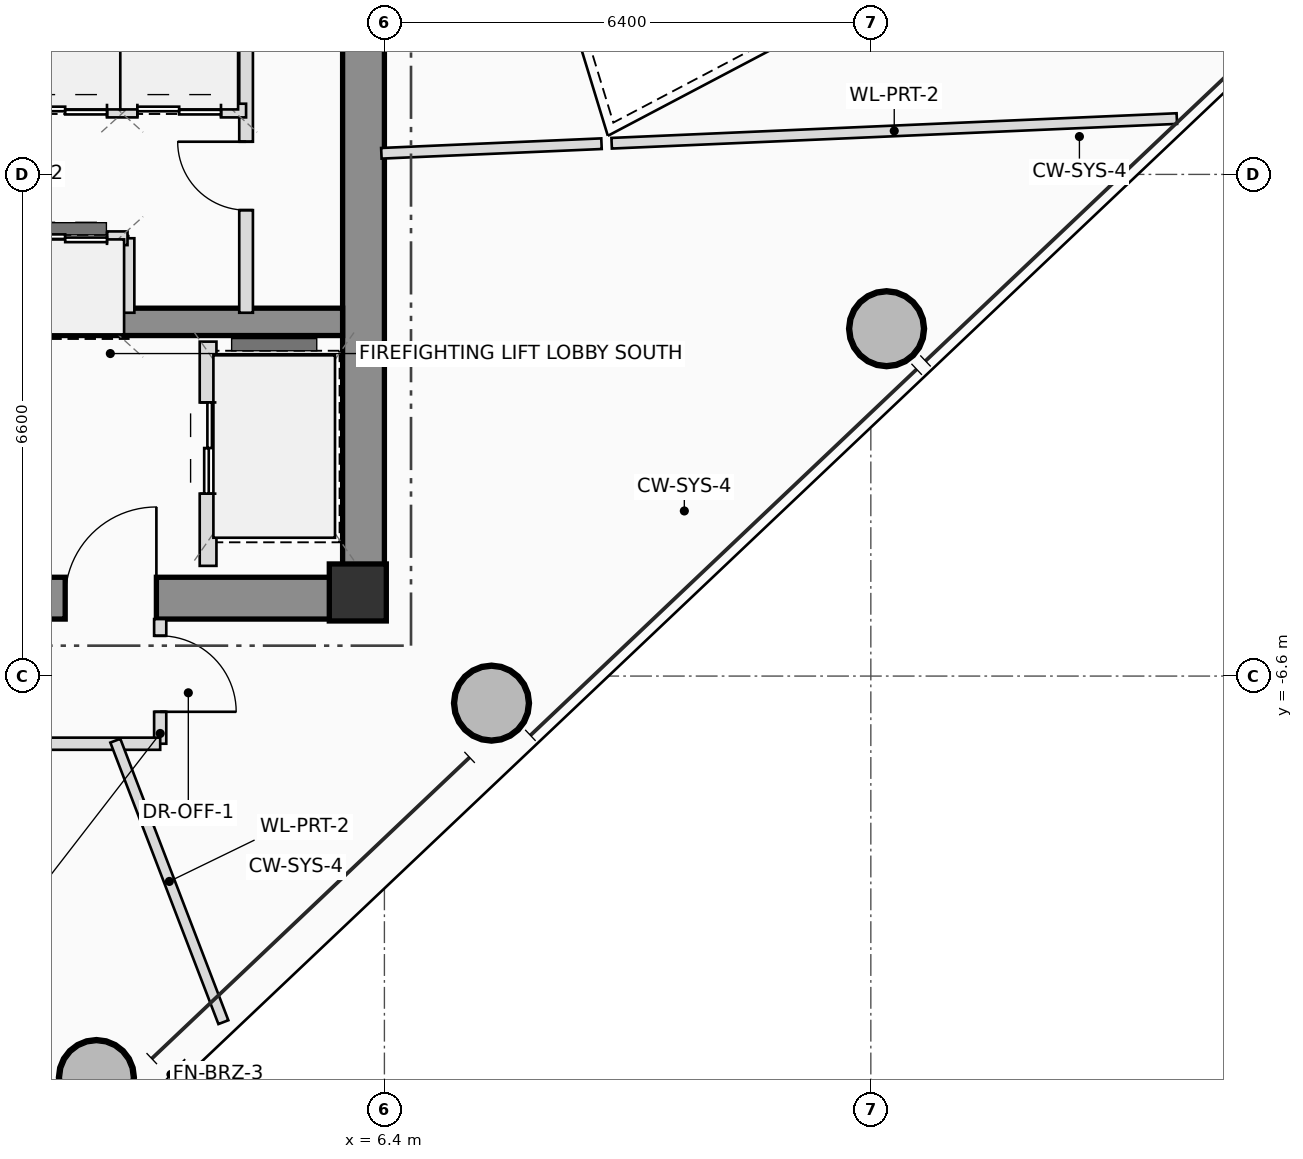
"""IFC4 building model, lengths in metres.
Left out: names, types, materials, properties, quantities, classifications, styles, units other than length and angle.
Written with IfcOpenShell. Run it as: python <this file> out.ifc"""

import sys

from ifc_helpers import new_model, si_unit, direction, frame, frame_2d, origin, origin_2d, place, context, subcontext, project, spatial, rectangle, hollow_circle, extrude, source, transform, mapped, element, fill, save


model = new_model("IFC4")
c1 = context("Model", 3, precision=1e-05, world=origin(), true_north=direction((0.0, 1.0)))
c2 = subcontext(c1, "Body", "Model", "MODEL_VIEW")
j1 = project(units=[si_unit("LENGTHUNIT", "METRE"), si_unit("PLANEANGLEUNIT", "RADIAN")], contexts=[c1])
p1 = place(None, origin())
s1 = spatial("IfcSite", under=j1, at=p1, CompositionType="ELEMENT")
p2 = place(p1, origin())
s2 = spatial("IfcBuilding", under=s1, at=p2, CompositionType="ELEMENT")
p3 = place(p2, frame((0.0, 0.0, 238.85)))
s3 = spatial("IfcBuildingStorey", under=s2, at=p3, CompositionType="ELEMENT", Elevation=238.85)
m1 = source(origin(), c2, "Body", "SweptSolid", [
    extrude(rectangle(XDim=0.75, YDim=0.75, at=origin_2d()), origin(), (0.0, 0.0, 1.0), 3.4),
])
p4 = place(p3, frame((6.05, -5.5, 0.0), z_axis=(0.0, 0.0, 1.0), x_axis=(1.0, 0.0, 0.0)))
e1 = element("IfcColumn", 1, at=p4, inside=s3, PredefinedType="COLUMN", context=c2, shape_type="MappedRepresentation", body=[
    mapped(m1, transform((0.0, 0.0, 0.0), scale=1.0)),
])
p5 = place(p3, frame((-6.4, -5.575, 0.0), z_axis=(0.0, 0.0, 1.0), x_axis=(1.0, 0.0, 0.0)))
e2 = element("IfcWall", 2, at=p5, inside=s3, PredefinedType="SHEAR", context=c2, shape_type="SweptSolid", body=[
    extrude(rectangle(XDim=12.8, YDim=0.55, at=frame_2d((6.4, 0.0))), origin(), (0.0, 0.0, 1.0), 3.4),
])
p6 = place(p5, frame((8.6, 0.0, 0.0)))
e3 = element("IfcOpeningElement", 3, at=p6, cuts=e2, PredefinedType="OPENING", context=c2, shape_type="SweptSolid", body=[
    extrude(rectangle(XDim=1.2, YDim=2.2, at=frame_2d((0.6, 1.1))), frame((0.0, 0.285, 0.0), z_axis=(0.0, -1.0, 0.0), x_axis=(1.0, 0.0, 0.0)), (0.0, 0.0, 1.0), 0.57),
])
p7 = place(p3, frame((6.125, -5.3, 0.0), z_axis=(0.0, 0.0, 1.0), x_axis=(0.0, 1.0, 0.0)))
e4 = element("IfcWall", 4, at=p7, inside=s3, PredefinedType="SHEAR", context=c2, shape_type="SweptSolid", body=[
    extrude(rectangle(XDim=10.6, YDim=0.55, at=frame_2d((5.3, 0.0))), origin(), (0.0, 0.0, 1.0), 3.4),
])
p8 = place(p3, frame((-5.85, -1.94, 0.0), z_axis=(0.0, 0.0, 1.0), x_axis=(1.0, 0.0, 0.0)))
e5 = element("IfcWall", 5, at=p8, inside=s3, PredefinedType="SHEAR", context=c2, shape_type="SweptSolid", body=[
    extrude(rectangle(XDim=11.7, YDim=0.36, at=frame_2d((5.85, 0.0))), origin(), (0.0, 0.0, 1.0), 3.4),
])
m2 = source(origin(), c2, "Body", "SweptSolid", [
    extrude(hollow_circle(Radius=0.5, WallThickness=0.04, at=origin_2d()), origin(), (0.0, 0.0, 1.0), 3.4),
])
for number, where, z_axis, x_axis in (
    (6, (2.611, -11.882, 0.0), (0.0, 0.0, 1.0), (1.0, 0.0, 0.0)),
    (7, (7.809, -6.956, 0.0), (0.0, 0.0, 1.0), (1.0, 0.0, 0.0)),
    (8, (13.007, -2.03, 0.0), (0.0, 0.0, 1.0), (1.0, 0.0, 0.0)),
):
    element("IfcColumn", number, at=place(p3, frame(where, z_axis=z_axis, x_axis=x_axis)), inside=s3, PredefinedType="COLUMN", context=c2, shape_type="MappedRepresentation", body=[
        mapped(m2, transform((0.0, 0.0, 0.0), scale=1.0)),
    ])
p9 = place(p3, frame((4.08, -5.15, 0.0), z_axis=(0.0, 0.0, 1.0), x_axis=(0.0, 1.0, 0.0)))
e9 = element("IfcWall", 9, at=p9, inside=s3, PredefinedType="PLUMBINGWALL", context=c2, shape_type="SweptSolid", body=[
    extrude(rectangle(XDim=2.95, YDim=0.22, at=frame_2d((1.475, 0.0))), origin(), (0.0, 0.0, 1.0), 3.2),
])
p10 = place(p9, frame((0.95, 0.0, 0.0)))
e10 = element("IfcOpeningElement", 10, at=p10, cuts=e9, PredefinedType="OPENING", context=c2, shape_type="SweptSolid", body=[
    extrude(rectangle(XDim=1.2, YDim=2.25, at=frame_2d((0.6, 1.125))), frame((0.0, 0.12, 0.0), z_axis=(0.0, -1.0, 0.0), x_axis=(1.0, 0.0, 0.0)), (0.0, 0.0, 1.0), 0.24),
])
for number, where, z_axis, x_axis in (
    (11, (3.02, 0.84, 0.0), (0.0, 0.0, 1.0), (0.0, 1.0, 0.0)),
    (12, (4.38, 0.84, 0.0), (0.0, 0.0, 1.0), (0.0, 1.0, 0.0)),
    (13, (3.02, -1.82, 0.0), (0.0, 0.0, 1.0), (0.0, 1.0, 0.0)),
):
    element("IfcWall", number, at=place(p3, frame(where, z_axis=z_axis, x_axis=x_axis)), inside=s3, PredefinedType="PLUMBINGWALL", context=c2, shape_type="SweptSolid", body=[
        extrude(rectangle(XDim=0.98, YDim=0.18, at=frame_2d((0.49, 0.0))), origin(), (0.0, 0.0, 1.0), 3.2),
    ])
p11 = place(p3, frame((4.58, -1.82, 0.0), z_axis=(0.0, 0.0, 1.0), x_axis=(0.0, 1.0, 0.0)))
e14 = element("IfcWall", 14, at=p11, inside=s3, PredefinedType="PLUMBINGWALL", context=c2, shape_type="SweptSolid", body=[
    extrude(rectangle(XDim=3.64, YDim=0.18, at=frame_2d((1.82, 0.0))), origin(), (0.0, 0.0, 1.0), 3.2),
])
p12 = place(p11, frame((1.35, 0.0, 0.0)))
e15 = element("IfcOpeningElement", 15, at=p12, cuts=e14, PredefinedType="OPENING", context=c2, shape_type="SweptSolid", body=[
    extrude(rectangle(XDim=0.9, YDim=2.05, at=frame_2d((0.45, 1.025))), frame((0.0, 0.1, 0.0), z_axis=(0.0, -1.0, 0.0), x_axis=(1.0, 0.0, 0.0)), (0.0, 0.0, 1.0), 0.2),
])
p13 = place(p3, frame((-5.68, 0.84, 0.0), z_axis=(0.0, 0.0, 1.0), x_axis=(1.0, 0.0, 0.0)))
e16 = element("IfcWall", 16, at=p13, inside=s3, PredefinedType="PLUMBINGWALL", context=c2, shape_type="SweptSolid", body=[
    extrude(rectangle(XDim=10.26, YDim=0.18, at=frame_2d((5.13, 0.0))), origin(), (0.0, 0.0, 1.0), 3.2),
])
p14 = place(p13, frame((0.91, 0.0, 0.0)))
e17 = element("IfcOpeningElement", 17, at=p14, cuts=e16, PredefinedType="OPENING", context=c2, shape_type="SweptSolid", body=[
    extrude(rectangle(XDim=0.9, YDim=2.05, at=frame_2d((0.45, 1.025))), frame((0.0, 0.1, 0.0), z_axis=(0.0, -1.0, 0.0), x_axis=(1.0, 0.0, 0.0)), (0.0, 0.0, 1.0), 0.2),
])
p15 = place(p13, frame((4.38, 0.0, 0.0)))
e18 = element("IfcOpeningElement", 18, at=p15, cuts=e16, PredefinedType="OPENING", context=c2, shape_type="SweptSolid", body=[
    extrude(rectangle(XDim=0.9, YDim=2.05, at=frame_2d((0.45, 1.025))), frame((0.0, 0.1, 0.0), z_axis=(0.0, -1.0, 0.0), x_axis=(1.0, 0.0, 0.0)), (0.0, 0.0, 1.0), 0.2),
])
p16 = place(p13, frame((7.33, 0.0, 0.0)))
e19 = element("IfcOpeningElement", 19, at=p16, cuts=e16, PredefinedType="OPENING", context=c2, shape_type="SweptSolid", body=[
    extrude(rectangle(XDim=1.1, YDim=2.2, at=frame_2d((0.55, 1.1))), frame((0.0, 0.1, 0.0), z_axis=(0.0, -1.0, 0.0), x_axis=(1.0, 0.0, 0.0)), (0.0, 0.0, 1.0), 0.2),
])
p17 = place(p13, frame((8.83, 0.0, 0.0)))
e20 = element("IfcOpeningElement", 20, at=p17, cuts=e16, PredefinedType="OPENING", context=c2, shape_type="SweptSolid", body=[
    extrude(rectangle(XDim=1.1, YDim=2.2, at=frame_2d((0.55, 1.1))), frame((0.0, 0.1, 0.0), z_axis=(0.0, -1.0, 0.0), x_axis=(1.0, 0.0, 0.0)), (0.0, 0.0, 1.0), 0.2),
])
p18 = place(p3, frame((-5.68, -0.84, 0.0), z_axis=(0.0, 0.0, 1.0), x_axis=(1.0, 0.0, 0.0)))
e21 = element("IfcWall", 21, at=p18, inside=s3, PredefinedType="PLUMBINGWALL", context=c2, shape_type="SweptSolid", body=[
    extrude(rectangle(XDim=8.7, YDim=0.18, at=frame_2d((4.35, 0.0))), origin(), (0.0, 0.0, 1.0), 3.2),
])
p19 = place(p18, frame((3.13, 0.0, 0.0)))
e22 = element("IfcOpeningElement", 22, at=p19, cuts=e21, PredefinedType="OPENING", context=c2, shape_type="SweptSolid", body=[
    extrude(rectangle(XDim=0.9, YDim=2.05, at=frame_2d((0.45, 1.025))), frame((0.0, 0.1, 0.0), z_axis=(0.0, -1.0, 0.0), x_axis=(1.0, 0.0, 0.0)), (0.0, 0.0, 1.0), 0.2),
])
p20 = place(p18, frame((7.33, 0.0, 0.0)))
e23 = element("IfcOpeningElement", 23, at=p20, cuts=e21, PredefinedType="OPENING", context=c2, shape_type="SweptSolid", body=[
    extrude(rectangle(XDim=1.1, YDim=2.2, at=frame_2d((0.55, 1.1))), frame((0.0, 0.1, 0.0), z_axis=(0.0, -1.0, 0.0), x_axis=(1.0, 0.0, 0.0)), (0.0, 0.0, 1.0), 0.2),
])
p21 = place(p3, frame((3.45, -5.85, 0.0), z_axis=(0.0, 0.0, 1.0), x_axis=(0.0, -1.0, 0.0)))
e24 = element("IfcWall", 24, at=p21, inside=s3, PredefinedType="PARTITIONING", context=c2, shape_type="SweptSolid", body=[
    extrude(rectangle(XDim=1.64, YDim=0.16, at=frame_2d((0.82, 0.0))), origin(), (0.0, 0.0, 1.0), 3.2),
])
p22 = place(p21, frame((0.22, 0.0, 0.0)))
e25 = element("IfcOpeningElement", 25, at=p22, cuts=e24, PredefinedType="OPENING", context=c2, shape_type="SweptSolid", body=[
    extrude(rectangle(XDim=1.0, YDim=2.25, at=frame_2d((0.5, 1.125))), frame((0.0, 0.09, 0.0), z_axis=(0.0, -1.0, 0.0), x_axis=(1.0, 0.0, 0.0)), (0.0, 0.0, 1.0), 0.18),
])
p23 = place(p3, frame((3.45, -7.49, 0.0), z_axis=(0.0, 0.0, 1.0), x_axis=(-1.0, 0.0, 0.0)))
e26 = element("IfcWall", 26, at=p23, inside=s3, PredefinedType="PARTITIONING", context=c2, shape_type="SweptSolid", body=[
    extrude(rectangle(XDim=9.81, YDim=0.16, at=frame_2d((4.905, 0.0))), origin(), (0.0, 0.0, 1.0), 2.605),
])
p24 = place(p23, frame((2.482, 0.0, 0.0)))
e27 = element("IfcOpeningElement", 27, at=p24, cuts=e26, PredefinedType="OPENING", context=c2, shape_type="SweptSolid", body=[
    extrude(rectangle(XDim=1.0, YDim=2.25, at=frame_2d((0.5, 1.125))), frame((0.0, 0.09, 0.0), z_axis=(0.0, -1.0, 0.0), x_axis=(1.0, 0.0, 0.0)), (0.0, 0.0, 1.0), 0.18),
])
p25 = place(p23, frame((7.021, 0.0, 0.0)))
e28 = element("IfcOpeningElement", 28, at=p25, cuts=e26, PredefinedType="OPENING", context=c2, shape_type="SweptSolid", body=[
    extrude(rectangle(XDim=1.0, YDim=2.25, at=frame_2d((0.5, 1.125))), frame((0.0, 0.09, 0.0), z_axis=(0.0, -1.0, 0.0), x_axis=(1.0, 0.0, 0.0)), (0.0, 0.0, 1.0), 0.18),
])
p26 = place(p3, frame((6.36, 0.278, 0.0), z_axis=(0.0, 0.0, 1.0), x_axis=(0.999048037217, 0.043623609819, 0.0)))
e29 = element("IfcWall", 29, at=p26, inside=s3, PredefinedType="PARTITIONING", context=c2, shape_type="SweptSolid", body=[
    extrude(rectangle(XDim=2.899, YDim=0.14, at=frame_2d((1.449, 0.0))), origin(), (0.0, 0.0, 1.0), 3.2),
])
p27 = place(p3, frame((9.39, 0.41, 0.0), z_axis=(0.0, 0.0, 1.0), x_axis=(0.999047971421, 0.043625116619, 0.0)))
e30 = element("IfcWall", 30, at=p27, inside=s3, PredefinedType="PARTITIONING", context=c2, shape_type="SweptSolid", body=[
    extrude(rectangle(XDim=7.443, YDim=0.14, at=frame_2d((3.722, 0.0))), origin(), (0.0, 0.0, 1.0), 2.605),
])
p28 = place(p3, frame((2.86, -7.45, 0.0), z_axis=(0.0, 0.0, 1.0), x_axis=(0.35834382605, -0.933589686282, 0.0)))
e31 = element("IfcWall", 31, at=p28, inside=s3, PredefinedType="PARTITIONING", context=c2, shape_type="SweptSolid", body=[
    extrude(rectangle(XDim=3.967, YDim=0.14, at=frame_2d((1.983, 0.0))), origin(), (0.0, 0.0, 1.0), 2.605),
])
p29 = place(p6, origin())
e32 = element("IfcDoor", 32, at=p29, inside=s3, OperationType="SINGLE_SWING_RIGHT", PredefinedType="DOOR", context=c2, shape_type="SweptSolid", body=[
    extrude(rectangle(XDim=1.2, YDim=2.2, at=frame_2d((0.6, 1.1))), frame((0.0, 0.025, 0.0), z_axis=(0.0, -1.0, 0.0), x_axis=(1.0, 0.0, 0.0)), (0.0, 0.0, 1.0), 0.05),
])
fill(e3, e32)
p30 = place(p10, origin())
e33 = element("IfcDoor", 33, at=p30, inside=s3, OperationType="DOUBLE_DOOR_SLIDING", PredefinedType="DOOR", context=c2, shape_type="SweptSolid", body=[
    extrude(rectangle(XDim=1.2, YDim=2.25, at=frame_2d((0.6, 1.125))), frame((0.0, 0.025, 0.0), z_axis=(0.0, -1.0, 0.0), x_axis=(1.0, 0.0, 0.0)), (0.0, 0.0, 1.0), 0.05),
])
fill(e10, e33)
p31 = place(p12, origin())
e34 = element("IfcDoor", 34, at=p31, inside=s3, OperationType="SINGLE_SWING_RIGHT", PredefinedType="DOOR", context=c2, shape_type="SweptSolid", body=[
    extrude(rectangle(XDim=0.9, YDim=2.05, at=frame_2d((0.45, 1.025))), frame((0.0, 0.025, 0.0), z_axis=(0.0, -1.0, 0.0), x_axis=(1.0, 0.0, 0.0)), (0.0, 0.0, 1.0), 0.05),
])
fill(e15, e34)
p32 = place(p16, origin())
e35 = element("IfcDoor", 35, at=p32, inside=s3, OperationType="DOUBLE_DOOR_SLIDING", PredefinedType="DOOR", context=c2, shape_type="SweptSolid", body=[
    extrude(rectangle(XDim=1.1, YDim=2.2, at=frame_2d((0.55, 1.1))), frame((0.0, 0.025, 0.0), z_axis=(0.0, -1.0, 0.0), x_axis=(1.0, 0.0, 0.0)), (0.0, 0.0, 1.0), 0.05),
])
fill(e19, e35)
p33 = place(p17, origin())
e36 = element("IfcDoor", 36, at=p33, inside=s3, OperationType="DOUBLE_DOOR_SLIDING", PredefinedType="DOOR", context=c2, shape_type="SweptSolid", body=[
    extrude(rectangle(XDim=1.1, YDim=2.2, at=frame_2d((0.55, 1.1))), frame((0.0, 0.025, 0.0), z_axis=(0.0, -1.0, 0.0), x_axis=(1.0, 0.0, 0.0)), (0.0, 0.0, 1.0), 0.05),
])
fill(e20, e36)
p34 = place(p20, origin())
e37 = element("IfcDoor", 37, at=p34, inside=s3, OperationType="DOUBLE_DOOR_SLIDING", PredefinedType="DOOR", context=c2, shape_type="SweptSolid", body=[
    extrude(rectangle(XDim=1.1, YDim=2.2, at=frame_2d((0.55, 1.1))), frame((0.0, 0.025, 0.0), z_axis=(0.0, -1.0, 0.0), x_axis=(1.0, 0.0, 0.0)), (0.0, 0.0, 1.0), 0.05),
])
fill(e23, e37)
p35 = place(p22, origin())
e38 = element("IfcDoor", 38, at=p35, inside=s3, OperationType="SINGLE_SWING_RIGHT", PredefinedType="DOOR", context=c2, shape_type="SweptSolid", body=[
    extrude(rectangle(XDim=1.0, YDim=2.25, at=frame_2d((0.5, 1.125))), frame((0.0, 0.025, 0.0), z_axis=(0.0, -1.0, 0.0), x_axis=(1.0, 0.0, 0.0)), (0.0, 0.0, 1.0), 0.05),
])
fill(e25, e38)
save(model, sys.argv[1])
